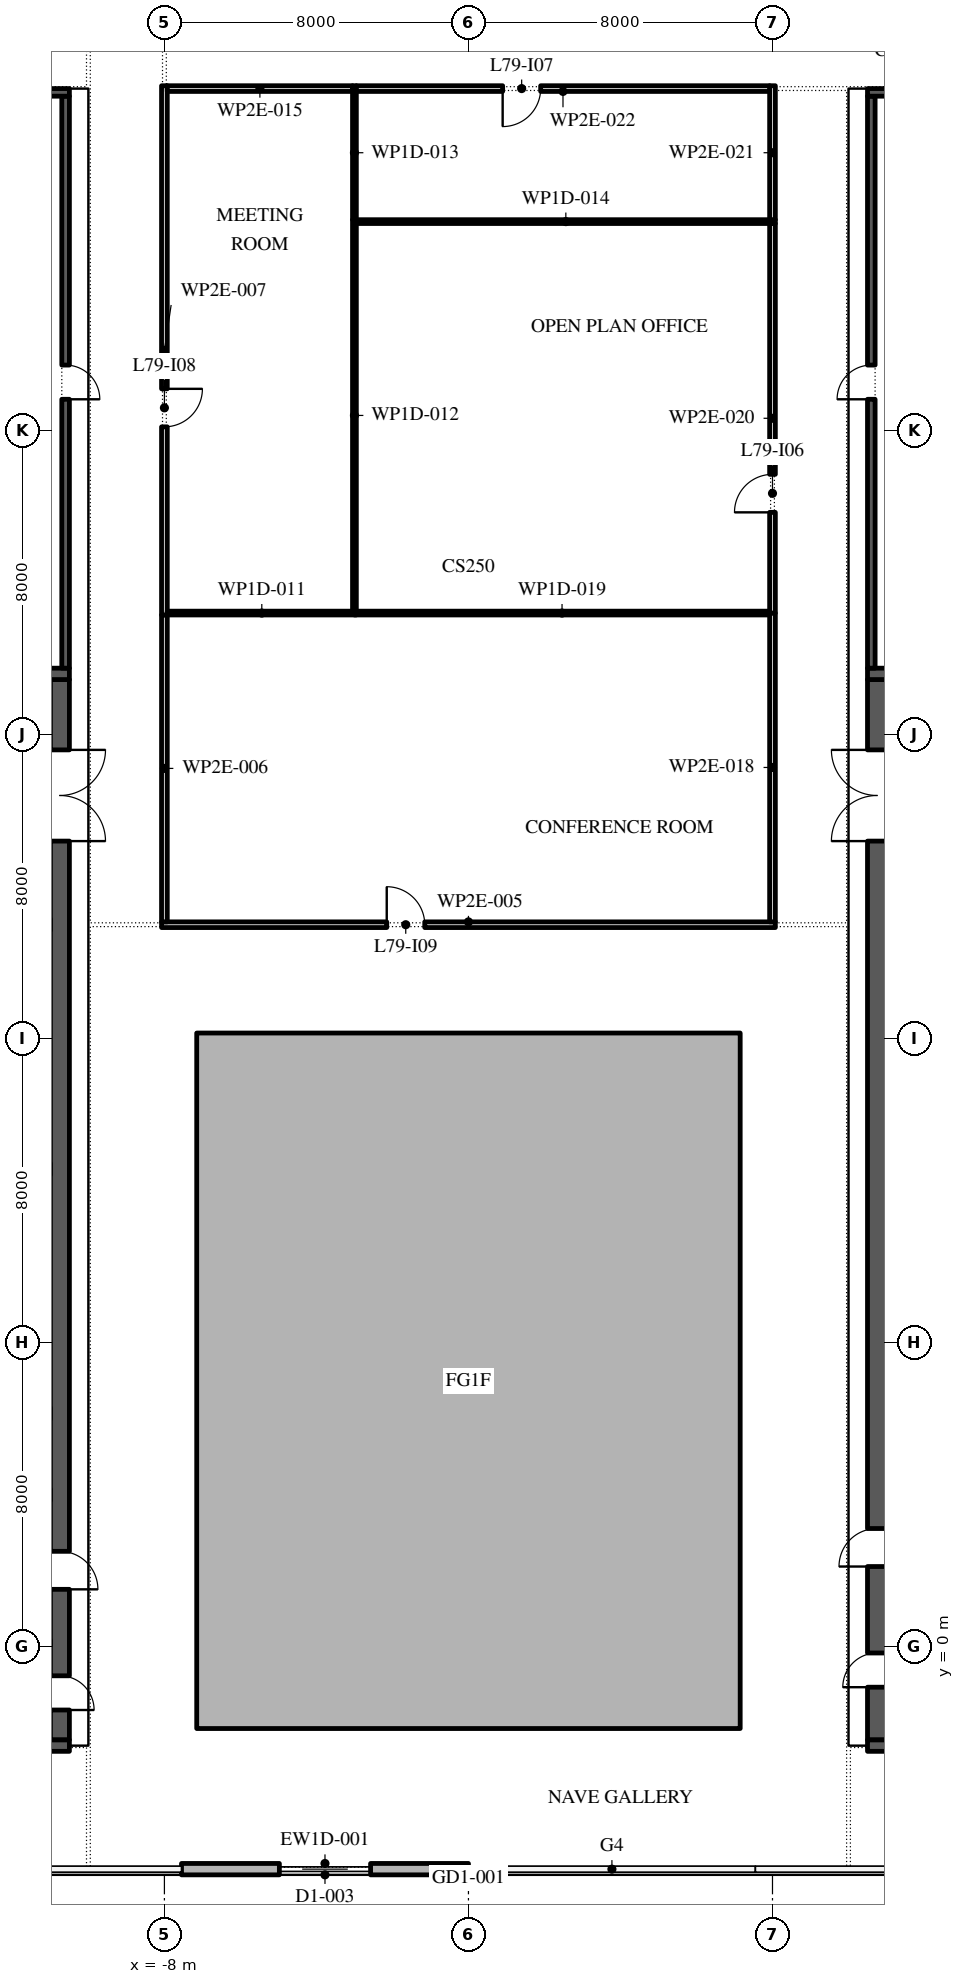
"""IFC4 building model, lengths in metres.
Left out: names, types, materials, properties, quantities, classifications, styles, units other than length and angle.
Written with IfcOpenShell. Run it as: python <this file> out.ifc"""

import sys

from ifc_helpers import new_model, si_unit, direction, frame, frame_2d, origin, place, context, subcontext, project, spatial, polyline, rectangle, outline, extrude, element, fill, save


model = new_model("IFC4")
c1 = context("Model", 3, precision=1e-05, world=origin(), true_north=direction((0.0, 1.0)))
c2 = subcontext(c1, "Body", "Model", "MODEL_VIEW")
j1 = project(units=[si_unit("LENGTHUNIT", "METRE"), si_unit("PLANEANGLEUNIT", "RADIAN")], contexts=[c1])
p1 = place(None, origin())
s1 = spatial("IfcSite", under=j1, at=p1, CompositionType="ELEMENT")
p2 = place(p1, origin())
s2 = spatial("IfcBuilding", under=s1, at=p2, CompositionType="ELEMENT")
p3 = place(p2, frame((0.0, 0.0, 359.4)))
s3 = spatial("IfcBuildingStorey", under=s2, at=p3, CompositionType="ELEMENT", Elevation=359.4)
p4 = place(p3, origin())
e1 = element("IfcWall", 1, at=p4, inside=s3, PredefinedType="STANDARD", context=c2, shape_type="SweptSolid", body=[
    extrude(outline(polyline([(-7.15, -2.15), (7.15, -2.15), (7.15, 16.15), (-7.15, 16.15), (-7.15, -2.15)]), holes=[polyline([(-7.0, -2.0), (-7.0, 16.0), (7.0, 16.0), (7.0, -2.0), (-7.0, -2.0)])]), origin(), (0.0, 0.0, 1.0), 3.9),
])
p5 = place(p3, frame((-7.55, -5.85, 0.0), z_axis=(0.0, 0.0, 1.0), x_axis=(1.0, 0.0, 0.0)))
e2 = element("IfcWall", 2, at=p5, inside=s3, PredefinedType="STANDARD", context=c2, shape_type="SweptSolid", body=[
    extrude(rectangle(XDim=7.55, YDim=0.3, at=frame_2d((3.775, 0.0))), origin(), (0.0, 0.0, 1.0), 3.9),
])
p6 = place(p5, frame((2.575, 0.0, 0.0)))
e3 = element("IfcOpeningElement", 3, at=p6, cuts=e2, PredefinedType="OPENING", context=c2, shape_type="SweptSolid", body=[
    extrude(rectangle(XDim=2.4, YDim=3.5, at=frame_2d((1.2, 1.75))), frame((0.0, 0.16, 0.0), z_axis=(0.0, -1.0, 0.0), x_axis=(1.0, 0.0, 0.0)), (0.0, 0.0, 1.0), 0.32),
])
p7 = place(p3, frame((-10.75, -2.45, 0.0), z_axis=(0.0, 0.0, 1.0), x_axis=(0.0, 1.0, 0.0)))
e4 = element("IfcWall", 4, at=p7, inside=s3, PredefinedType="SHEAR", context=c2, shape_type="SweptSolid", body=[
    extrude(rectangle(XDim=27.9, YDim=0.5, at=frame_2d((13.95, 0.0))), origin(), (0.0, 0.0, 1.0), 3.9),
])
p8 = place(p7, frame((23.65, 0.0, 0.0)))
e5 = element("IfcOpeningElement", 5, at=p8, cuts=e4, PredefinedType="OPENING", context=c2, shape_type="SweptSolid", body=[
    extrude(rectangle(XDim=2.4, YDim=2.1, at=frame_2d((1.2, 1.05))), frame((0.0, 0.26, 0.0), z_axis=(0.0, -1.0, 0.0), x_axis=(1.0, 0.0, 0.0)), (0.0, 0.0, 1.0), 0.52),
])
p9 = place(p7, frame((0.788, 0.0, 0.0)))
e6 = element("IfcOpeningElement", 6, at=p9, cuts=e4, PredefinedType="OPENING", context=c2, shape_type="SweptSolid", body=[
    extrude(rectangle(XDim=0.9, YDim=2.1, at=frame_2d((0.45, 1.05))), frame((0.0, 0.26, 0.0), z_axis=(0.0, -1.0, 0.0), x_axis=(1.0, 0.0, 0.0)), (0.0, 0.0, 1.0), 0.52),
])
p10 = place(p7, frame((3.962, 0.0, 0.0)))
e7 = element("IfcOpeningElement", 7, at=p10, cuts=e4, PredefinedType="OPENING", context=c2, shape_type="SweptSolid", body=[
    extrude(rectangle(XDim=1.0, YDim=2.1, at=frame_2d((0.5, 1.05))), frame((0.0, 0.26, 0.0), z_axis=(0.0, -1.0, 0.0), x_axis=(1.0, 0.0, 0.0)), (0.0, 0.0, 1.0), 0.52),
])
for number, where, z_axis, x_axis in (
    (8, (-21.5, -2.6, 0.0), (0.0, 0.0, 1.0), (1.0, 0.0, 0.0)),
    (9, (-21.5, 25.6, 0.0), (0.0, 0.0, 1.0), (1.0, 0.0, 0.0)),
):
    element("IfcWall", number, at=place(p3, frame(where, z_axis=z_axis, x_axis=x_axis)), inside=s3, PredefinedType="SHEAR", context=c2, shape_type="SweptSolid", body=[
        extrude(rectangle(XDim=11.0, YDim=0.3, at=frame_2d((5.5, 0.0))), origin(), (0.0, 0.0, 1.0), 3.9),
    ])
p11 = place(p3, frame((-10.6, 25.75, 0.0), z_axis=(0.0, 0.0, 1.0), x_axis=(0.0, 1.0, 0.0)))
e10 = element("IfcWall", 10, at=p11, inside=s3, PredefinedType="SHEAR", context=c2, shape_type="SweptSolid", body=[
    extrude(rectangle(XDim=15.05, YDim=0.2, at=frame_2d((7.525, 0.0))), origin(), (0.0, 0.0, 1.0), 3.9),
])
p12 = place(p11, frame((7.075, 0.0, 0.0)))
e11 = element("IfcOpeningElement", 11, at=p12, cuts=e10, PredefinedType="OPENING", context=c2, shape_type="SweptSolid", body=[
    extrude(rectangle(XDim=0.9, YDim=2.1, at=frame_2d((0.45, 1.05))), frame((0.0, 0.11, 0.0), z_axis=(0.0, -1.0, 0.0), x_axis=(1.0, 0.0, 0.0)), (0.0, 0.0, 1.0), 0.22),
])
p13 = place(p3, frame((-21.5, 40.9, 0.0), z_axis=(0.0, 0.0, 1.0), x_axis=(1.0, 0.0, 0.0)))
e12 = element("IfcWall", 12, at=p13, inside=s3, PredefinedType="SHEAR", context=c2, shape_type="SweptSolid", body=[
    extrude(rectangle(XDim=11.0, YDim=0.2, at=frame_2d((5.5, 0.0))), origin(), (0.0, 0.0, 1.0), 3.9),
])
p14 = place(p3, frame((10.75, -2.45, 0.0), z_axis=(0.0, 0.0, 1.0), x_axis=(0.0, 1.0, 0.0)))
e13 = element("IfcWall", 13, at=p14, inside=s3, PredefinedType="SHEAR", context=c2, shape_type="SweptSolid", body=[
    extrude(rectangle(XDim=27.9, YDim=0.5, at=frame_2d((13.95, 0.0))), origin(), (0.0, 0.0, 1.0), 3.9),
])
p15 = place(p14, frame((23.65, 0.0, 0.0)))
e14 = element("IfcOpeningElement", 14, at=p15, cuts=e13, PredefinedType="OPENING", context=c2, shape_type="SweptSolid", body=[
    extrude(rectangle(XDim=2.4, YDim=2.1, at=frame_2d((1.2, 1.05))), frame((0.0, 0.26, 0.0), z_axis=(0.0, -1.0, 0.0), x_axis=(1.0, 0.0, 0.0)), (0.0, 0.0, 1.0), 0.52),
])
p16 = place(p14, frame((1.387, 0.0, 0.0)))
e15 = element("IfcOpeningElement", 15, at=p16, cuts=e13, PredefinedType="OPENING", context=c2, shape_type="SweptSolid", body=[
    extrude(rectangle(XDim=0.9, YDim=2.1, at=frame_2d((0.45, 1.05))), frame((0.0, 0.26, 0.0), z_axis=(0.0, -1.0, 0.0), x_axis=(1.0, 0.0, 0.0)), (0.0, 0.0, 1.0), 0.52),
])
p17 = place(p14, frame((4.562, 0.0, 0.0)))
e16 = element("IfcOpeningElement", 16, at=p17, cuts=e13, PredefinedType="OPENING", context=c2, shape_type="SweptSolid", body=[
    extrude(rectangle(XDim=1.0, YDim=2.1, at=frame_2d((0.5, 1.05))), frame((0.0, 0.26, 0.0), z_axis=(0.0, -1.0, 0.0), x_axis=(1.0, 0.0, 0.0)), (0.0, 0.0, 1.0), 0.52),
])
for number, where, z_axis, x_axis in (
    (17, (10.5, -2.6, 0.0), (0.0, 0.0, 1.0), (1.0, 0.0, 0.0)),
    (18, (10.5, 25.6, 0.0), (0.0, 0.0, 1.0), (1.0, 0.0, 0.0)),
):
    element("IfcWall", number, at=place(p3, frame(where, z_axis=z_axis, x_axis=x_axis)), inside=s3, PredefinedType="SHEAR", context=c2, shape_type="SweptSolid", body=[
        extrude(rectangle(XDim=11.0, YDim=0.3, at=frame_2d((5.5, 0.0))), origin(), (0.0, 0.0, 1.0), 3.9),
    ])
p18 = place(p3, frame((10.6, 25.75, 0.0), z_axis=(0.0, 0.0, 1.0), x_axis=(0.0, 1.0, 0.0)))
e19 = element("IfcWall", 19, at=p18, inside=s3, PredefinedType="SHEAR", context=c2, shape_type="SweptSolid", body=[
    extrude(rectangle(XDim=15.05, YDim=0.2, at=frame_2d((7.525, 0.0))), origin(), (0.0, 0.0, 1.0), 3.9),
])
p19 = place(p18, frame((7.075, 0.0, 0.0)))
e20 = element("IfcOpeningElement", 20, at=p19, cuts=e19, PredefinedType="OPENING", context=c2, shape_type="SweptSolid", body=[
    extrude(rectangle(XDim=0.9, YDim=2.1, at=frame_2d((0.45, 1.05))), frame((0.0, 0.11, 0.0), z_axis=(0.0, -1.0, 0.0), x_axis=(1.0, 0.0, 0.0)), (0.0, 0.0, 1.0), 0.22),
])
p20 = place(p3, frame((10.5, 40.9, 0.0), z_axis=(0.0, 0.0, 1.0), x_axis=(1.0, 0.0, 0.0)))
e21 = element("IfcWall", 21, at=p20, inside=s3, PredefinedType="SHEAR", context=c2, shape_type="SweptSolid", body=[
    extrude(rectangle(XDim=11.0, YDim=0.2, at=frame_2d((5.5, 0.0))), origin(), (0.0, 0.0, 1.0), 3.9),
])
p21 = place(p3, frame((-8.075, 19.0, 0.0), z_axis=(0.0, 0.0, 1.0), x_axis=(1.0, 0.0, 0.0)))
e22 = element("IfcWall", 22, at=p21, inside=s3, PredefinedType="PARTITIONING", context=c2, shape_type="SweptSolid", body=[
    extrude(rectangle(XDim=16.15, YDim=0.15, at=frame_2d((8.075, 0.0))), origin(), (0.0, 0.0, 1.0), 3.9),
])
p22 = place(p21, frame((5.925, 0.0, 0.0)))
e23 = element("IfcOpeningElement", 23, at=p22, cuts=e22, PredefinedType="OPENING", context=c2, shape_type="SweptSolid", body=[
    extrude(rectangle(XDim=1.0, YDim=2.1, at=frame_2d((0.5, 1.05))), frame((0.0, 0.085, 0.0), z_axis=(0.0, -1.0, 0.0), x_axis=(1.0, 0.0, 0.0)), (0.0, 0.0, 1.0), 0.17),
])
p23 = place(p3, frame((-8.0, 27.15, 0.0), z_axis=(0.0, 0.0, 1.0), x_axis=(0.0, -1.0, 0.0)))
e24 = element("IfcWall", 24, at=p23, inside=s3, PredefinedType="PARTITIONING", context=c2, shape_type="SweptSolid", body=[
    extrude(rectangle(XDim=8.075, YDim=0.15, at=frame_2d((4.038, 0.0))), origin(), (0.0, 0.0, 1.0), 3.9),
])
p24 = place(p3, frame((-8.0, 41.075, 0.0), z_axis=(0.0, 0.0, 1.0), x_axis=(0.0, -1.0, 0.0)))
e25 = element("IfcWall", 25, at=p24, inside=s3, PredefinedType="PARTITIONING", context=c2, shape_type="SweptSolid", body=[
    extrude(rectangle(XDim=13.925, YDim=0.15, at=frame_2d((6.962, 0.0))), origin(), (0.0, 0.0, 1.0), 3.9),
])
p25 = place(p24, frame((7.975, 0.0, 0.0)))
e26 = element("IfcOpeningElement", 26, at=p25, cuts=e25, PredefinedType="OPENING", context=c2, shape_type="SweptSolid", body=[
    extrude(rectangle(XDim=1.0, YDim=2.1, at=frame_2d((0.5, 1.05))), frame((0.0, 0.085, 0.0), z_axis=(0.0, -1.0, 0.0), x_axis=(1.0, 0.0, 0.0)), (0.0, 0.0, 1.0), 0.17),
])
p26 = place(p3, frame((-2.95, 27.2, 0.0), z_axis=(0.0, 0.0, 1.0), x_axis=(-1.0, 0.0, 0.0)))
e27 = element("IfcWall", 27, at=p26, inside=s3, PredefinedType="PARTITIONING", context=c2, shape_type="SweptSolid", body=[
    extrude(rectangle(XDim=4.975, YDim=0.1, at=frame_2d((2.488, 0.0))), origin(), (0.0, 0.0, 1.0), 3.9),
])
p27 = place(p3, frame((-3.0, 27.25, 0.0), z_axis=(0.0, 0.0, 1.0), x_axis=(0.0, 1.0, 0.0)))
e28 = element("IfcWall", 28, at=p27, inside=s3, PredefinedType="PARTITIONING", context=c2, shape_type="SweptSolid", body=[
    extrude(rectangle(XDim=10.3, YDim=0.1, at=frame_2d((5.15, 0.0))), origin(), (0.0, 0.0, 1.0), 3.9),
])
p28 = place(p3, frame((-3.0, 37.55, 0.0), z_axis=(0.0, 0.0, 1.0), x_axis=(0.0, 1.0, 0.0)))
e29 = element("IfcWall", 29, at=p28, inside=s3, PredefinedType="PARTITIONING", context=c2, shape_type="SweptSolid", body=[
    extrude(rectangle(XDim=3.525, YDim=0.1, at=frame_2d((1.762, 0.0))), origin(), (0.0, 0.0, 1.0), 3.9),
])
p29 = place(p3, frame((-2.95, 37.5, 0.0), z_axis=(0.0, 0.0, 1.0), x_axis=(1.0, 0.0, 0.0)))
e30 = element("IfcWall", 30, at=p29, inside=s3, PredefinedType="PARTITIONING", context=c2, shape_type="SweptSolid", body=[
    extrude(rectangle(XDim=11.025, YDim=0.1, at=frame_2d((5.512, 0.0))), origin(), (0.0, 0.0, 1.0), 3.9),
])
p30 = place(p3, frame((-3.05, 41.0, 0.0), z_axis=(0.0, 0.0, 1.0), x_axis=(-1.0, 0.0, 0.0)))
e31 = element("IfcWall", 31, at=p30, inside=s3, PredefinedType="PARTITIONING", context=c2, shape_type="SweptSolid", body=[
    extrude(rectangle(XDim=4.875, YDim=0.15, at=frame_2d((2.438, 0.0))), origin(), (0.0, 0.0, 1.0), 3.9),
])
p31 = place(p3, frame((8.0, 19.075, 0.0), z_axis=(0.0, 0.0, 1.0), x_axis=(0.0, 1.0, 0.0)))
e32 = element("IfcWall", 32, at=p31, inside=s3, PredefinedType="PARTITIONING", context=c2, shape_type="SweptSolid", body=[
    extrude(rectangle(XDim=8.125, YDim=0.15, at=frame_2d((4.062, 0.0))), origin(), (0.0, 0.0, 1.0), 3.9),
])
p32 = place(p3, frame((7.925, 27.2, 0.0), z_axis=(0.0, 0.0, 1.0), x_axis=(-1.0, 0.0, 0.0)))
e33 = element("IfcWall", 33, at=p32, inside=s3, PredefinedType="PARTITIONING", context=c2, shape_type="SweptSolid", body=[
    extrude(rectangle(XDim=10.925, YDim=0.1, at=frame_2d((5.462, 0.0))), origin(), (0.0, 0.0, 1.0), 3.9),
])
p33 = place(p3, frame((8.0, 27.2, 0.0), z_axis=(0.0, 0.0, 1.0), x_axis=(0.0, 1.0, 0.0)))
e34 = element("IfcWall", 34, at=p33, inside=s3, PredefinedType="PARTITIONING", context=c2, shape_type="SweptSolid", body=[
    extrude(rectangle(XDim=10.25, YDim=0.15, at=frame_2d((5.125, 0.0))), origin(), (0.0, 0.0, 1.0), 3.9),
])
p34 = place(p33, frame((2.65, 0.0, 0.0)))
e35 = element("IfcOpeningElement", 35, at=p34, cuts=e34, PredefinedType="OPENING", context=c2, shape_type="SweptSolid", body=[
    extrude(rectangle(XDim=1.0, YDim=2.1, at=frame_2d((0.5, 1.05))), frame((0.0, 0.085, 0.0), z_axis=(0.0, -1.0, 0.0), x_axis=(1.0, 0.0, 0.0)), (0.0, 0.0, 1.0), 0.17),
])
p35 = place(p3, frame((8.0, 37.55, 0.0), z_axis=(0.0, 0.0, 1.0), x_axis=(0.0, 1.0, 0.0)))
e36 = element("IfcWall", 36, at=p35, inside=s3, PredefinedType="PARTITIONING", context=c2, shape_type="SweptSolid", body=[
    extrude(rectangle(XDim=3.525, YDim=0.15, at=frame_2d((1.762, 0.0))), origin(), (0.0, 0.0, 1.0), 3.9),
])
p36 = place(p3, frame((7.925, 41.0, 0.0), z_axis=(0.0, 0.0, 1.0), x_axis=(-1.0, 0.0, 0.0)))
e37 = element("IfcWall", 37, at=p36, inside=s3, PredefinedType="PARTITIONING", context=c2, shape_type="SweptSolid", body=[
    extrude(rectangle(XDim=10.875, YDim=0.15, at=frame_2d((5.438, 0.0))), origin(), (0.0, 0.0, 1.0), 3.9),
])
p37 = place(p36, frame((6.025, 0.0, 0.0)))
e38 = element("IfcOpeningElement", 38, at=p37, cuts=e37, PredefinedType="OPENING", context=c2, shape_type="SweptSolid", body=[
    extrude(rectangle(XDim=1.0, YDim=2.1, at=frame_2d((0.5, 1.05))), frame((0.0, 0.085, 0.0), z_axis=(0.0, -1.0, 0.0), x_axis=(1.0, 0.0, 0.0)), (0.0, 0.0, 1.0), 0.17),
])
p38 = place(p6, origin())
e39 = element("IfcDoor", 39, at=p38, inside=s3, OperationType="DOUBLE_DOOR_SLIDING", PredefinedType="DOOR", context=c2, shape_type="SweptSolid", body=[
    extrude(rectangle(XDim=2.4, YDim=3.5, at=frame_2d((1.2, 1.75))), frame((0.0, 0.025, 0.0), z_axis=(0.0, -1.0, 0.0), x_axis=(1.0, 0.0, 0.0)), (0.0, 0.0, 1.0), 0.05),
])
fill(e3, e39)
p39 = place(p8, frame((2.4, 0.0, 0.0), z_axis=(0.0, 0.0, 1.0), x_axis=(-1.0, 0.0, 0.0)))
e40 = element("IfcDoor", 40, at=p39, inside=s3, OperationType="DOUBLE_DOOR_SINGLE_SWING", PredefinedType="DOOR", context=c2, shape_type="SweptSolid", body=[
    extrude(rectangle(XDim=2.4, YDim=2.1, at=frame_2d((1.2, 1.05))), frame((0.0, 0.025, 0.0), z_axis=(0.0, -1.0, 0.0), x_axis=(1.0, 0.0, 0.0)), (0.0, 0.0, 1.0), 0.05),
])
fill(e5, e40)
p40 = place(p12, frame((0.9, 0.15, 0.0), z_axis=(0.0, 0.0, 1.0), x_axis=(-1.0, 0.0, 0.0)))
e41 = element("IfcDoor", 41, at=p40, inside=s3, OperationType="SINGLE_SWING_LEFT", PredefinedType="DOOR", context=c2, shape_type="SweptSolid", body=[
    extrude(rectangle(XDim=0.9, YDim=2.1, at=frame_2d((0.45, 1.05))), frame((0.0, 0.1, 0.0), z_axis=(0.0, -1.0, 0.0), x_axis=(1.0, 0.0, 0.0)), (0.0, 0.0, 1.0), 0.05),
])
fill(e11, e41)
p41 = place(p15, origin())
e42 = element("IfcDoor", 42, at=p41, inside=s3, OperationType="DOUBLE_DOOR_SINGLE_SWING", PredefinedType="DOOR", context=c2, shape_type="SweptSolid", body=[
    extrude(rectangle(XDim=2.4, YDim=2.1, at=frame_2d((1.2, 1.05))), frame((0.0, 0.025, 0.0), z_axis=(0.0, -1.0, 0.0), x_axis=(1.0, 0.0, 0.0)), (0.0, 0.0, 1.0), 0.05),
])
fill(e14, e42)
p42 = place(p19, origin())
e43 = element("IfcDoor", 43, at=p42, inside=s3, OperationType="SINGLE_SWING_RIGHT", PredefinedType="DOOR", context=c2, shape_type="SweptSolid", body=[
    extrude(rectangle(XDim=0.9, YDim=2.1, at=frame_2d((0.45, 1.05))), frame((0.0, -0.05, 0.0), z_axis=(0.0, -1.0, 0.0), x_axis=(1.0, 0.0, 0.0)), (0.0, 0.0, 1.0), 0.05),
])
fill(e20, e43)
p43 = place(p34, origin())
e44 = element("IfcDoor", 44, at=p43, inside=s3, OperationType="SINGLE_SWING_RIGHT", PredefinedType="DOOR", context=c2, shape_type="SweptSolid", body=[
    extrude(rectangle(XDim=1.0, YDim=2.1, at=frame_2d((0.5, 1.05))), frame((0.0, 0.025, 0.0), z_axis=(0.0, -1.0, 0.0), x_axis=(1.0, 0.0, 0.0)), (0.0, 0.0, 1.0), 0.05),
])
fill(e35, e44)
p44 = place(p37, origin())
e45 = element("IfcDoor", 45, at=p44, inside=s3, OperationType="SINGLE_SWING_LEFT", PredefinedType="DOOR", context=c2, shape_type="SweptSolid", body=[
    extrude(rectangle(XDim=1.0, YDim=2.1, at=frame_2d((0.5, 1.05))), frame((0.0, 0.025, 0.0), z_axis=(0.0, -1.0, 0.0), x_axis=(1.0, 0.0, 0.0)), (0.0, 0.0, 1.0), 0.05),
])
fill(e38, e45)
p45 = place(p25, origin())
e46 = element("IfcDoor", 46, at=p45, inside=s3, OperationType="SINGLE_SWING_RIGHT", PredefinedType="DOOR", context=c2, shape_type="SweptSolid", body=[
    extrude(rectangle(XDim=1.0, YDim=2.1, at=frame_2d((0.5, 1.05))), frame((0.0, 0.025, 0.0), z_axis=(0.0, -1.0, 0.0), x_axis=(1.0, 0.0, 0.0)), (0.0, 0.0, 1.0), 0.05),
])
fill(e26, e46)
p46 = place(p22, origin())
e47 = element("IfcDoor", 47, at=p46, inside=s3, OperationType="SINGLE_SWING_RIGHT", PredefinedType="DOOR", context=c2, shape_type="SweptSolid", body=[
    extrude(rectangle(XDim=1.0, YDim=2.1, at=frame_2d((0.5, 1.05))), frame((0.0, 0.025, 0.0), z_axis=(0.0, -1.0, 0.0), x_axis=(1.0, 0.0, 0.0)), (0.0, 0.0, 1.0), 0.05),
])
fill(e23, e47)
save(model, sys.argv[1])
